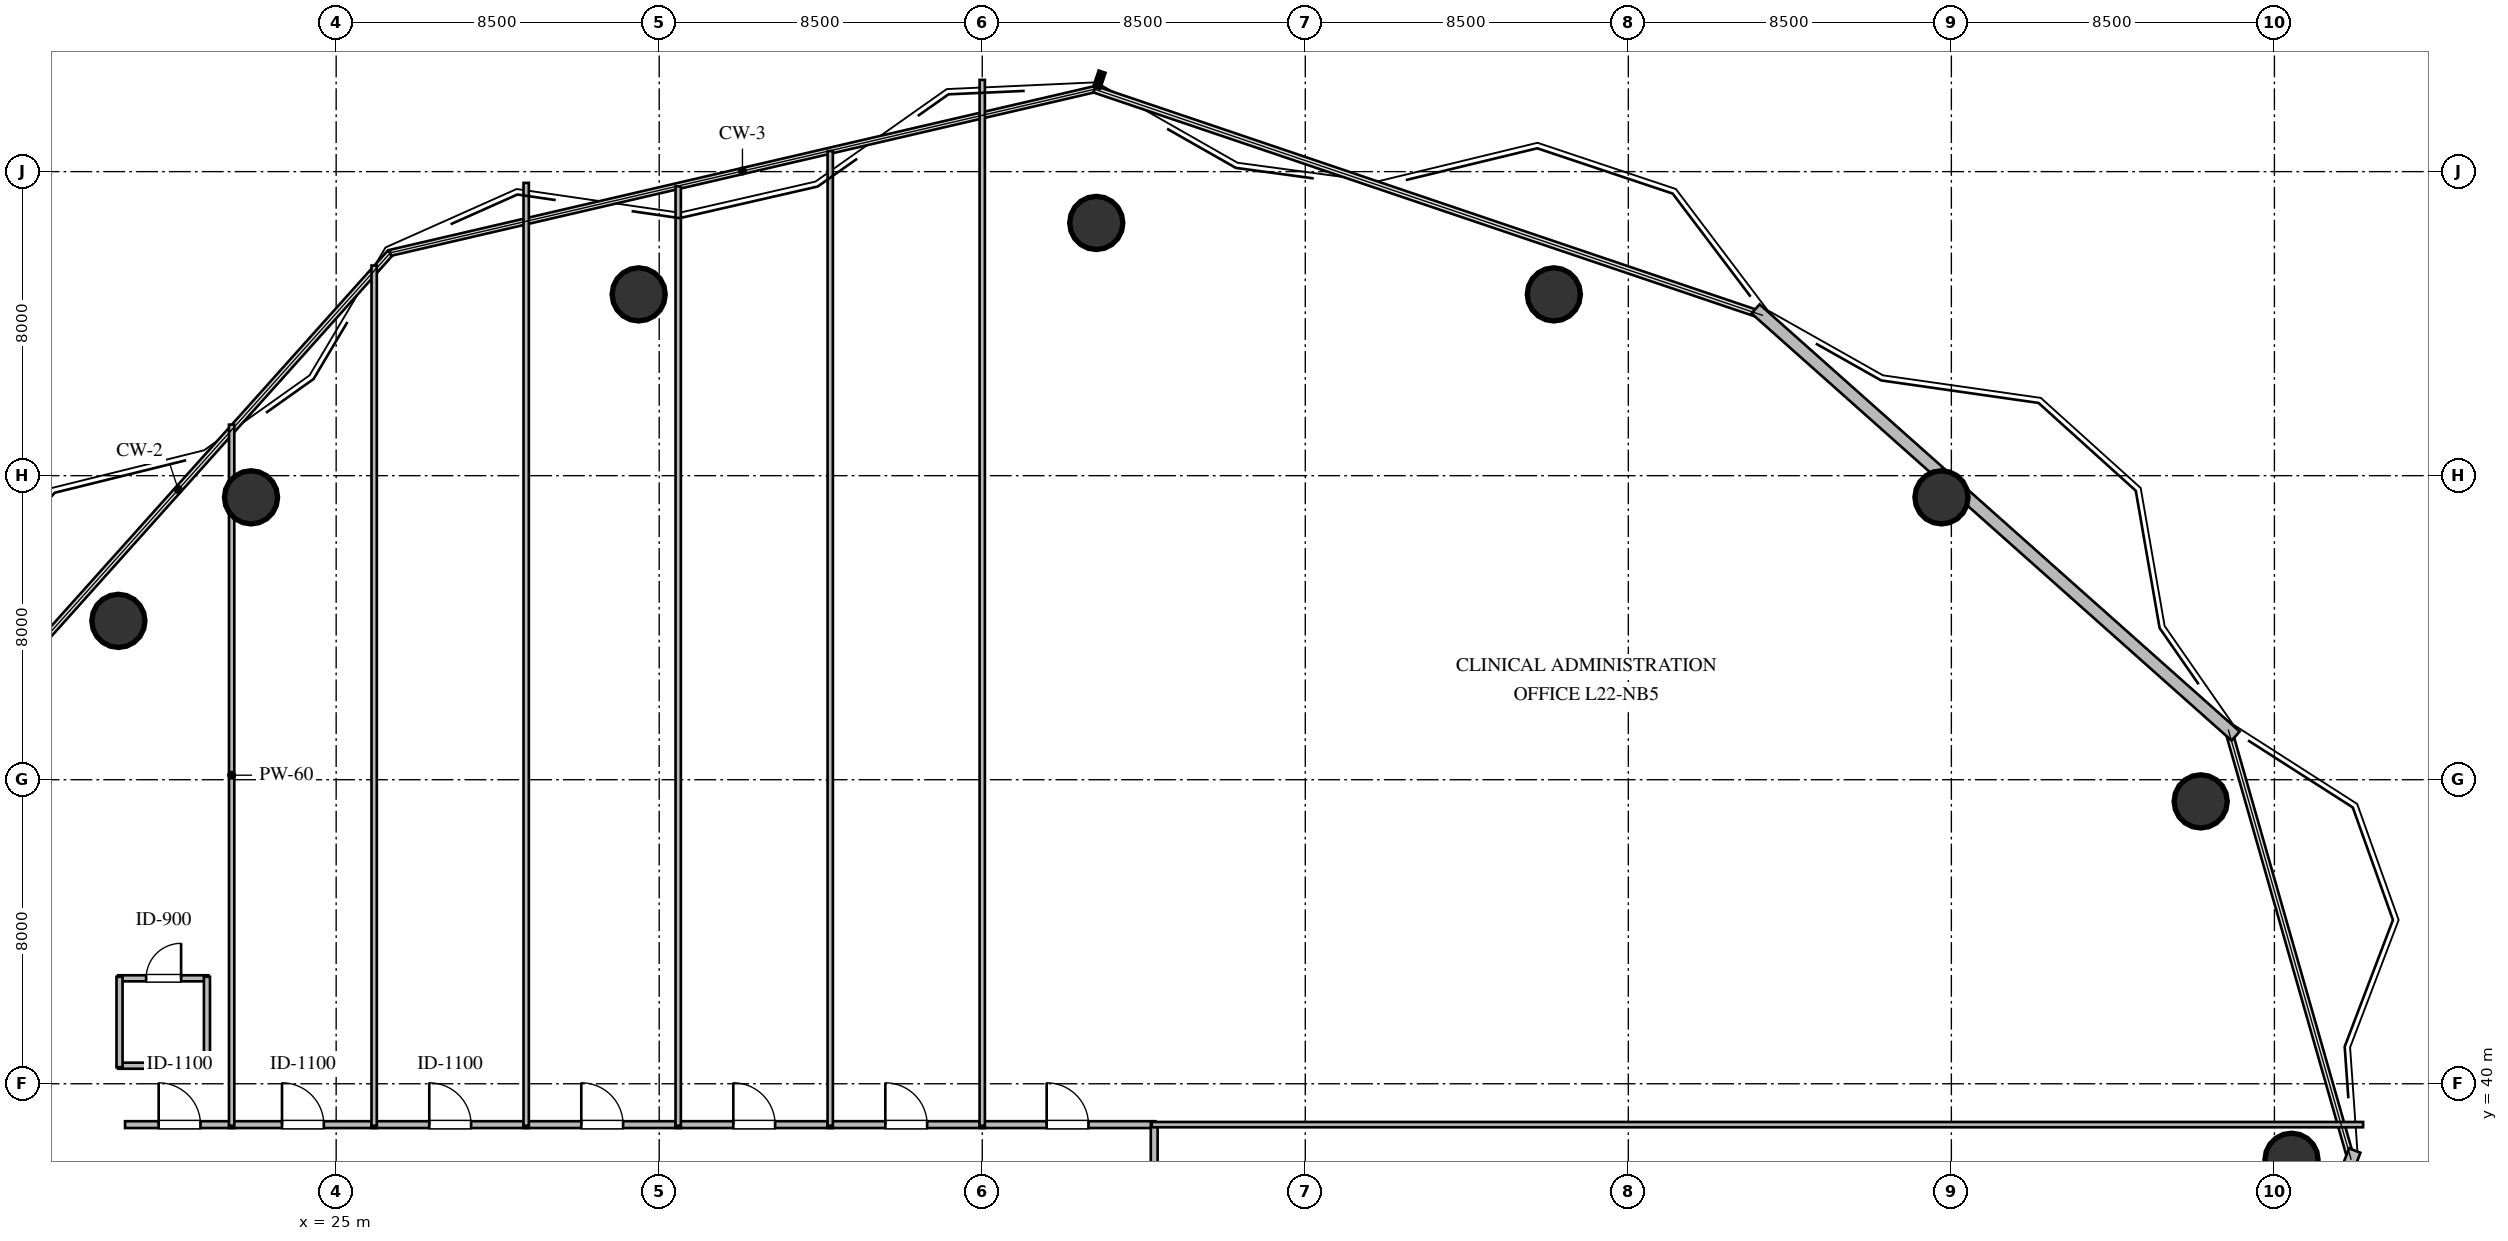
"""IFC4 building model, lengths in metres.
Left out: names, types, materials, properties, quantities, classifications, styles, units other than length and angle.
Written with IfcOpenShell. Run it as: python <this file> out.ifc"""

import sys

from ifc_helpers import new_model, si_unit, direction, frame, frame_2d, origin, origin_2d, place, context, subcontext, project, spatial, rectangle, circle, extrude, element, fill, save


model = new_model("IFC4")
c1 = context("Model", 3, precision=1e-05, world=origin(), true_north=direction((0.0, 1.0)))
c2 = subcontext(c1, "Body", "Model", "MODEL_VIEW")
j1 = project(units=[si_unit("LENGTHUNIT", "METRE"), si_unit("PLANEANGLEUNIT", "RADIAN")], contexts=[c1])
p1 = place(None, origin())
s1 = spatial("IfcSite", under=j1, at=p1, CompositionType="ELEMENT")
p2 = place(p1, origin())
s2 = spatial("IfcBuilding", under=s1, at=p2, CompositionType="ELEMENT")
p3 = place(p2, frame((0.0, 0.0, 85.2)))
s3 = spatial("IfcBuildingStorey", under=s2, at=p3, CompositionType="ELEMENT", Elevation=85.2)
for number, where, z_axis, x_axis in (
    (1, (76.45, 38.0, 0.0), (0.0, 0.0, 1.0), (1.0, 0.0, 0.0)),
    (2, (74.06, 47.43, 0.0), (0.0, 0.0, 1.0), (1.0, 0.0, 0.0)),
    (3, (67.24, 55.43, 0.0), (0.0, 0.0, 1.0), (1.0, 0.0, 0.0)),
    (4, (57.04, 60.77, 0.0), (0.0, 0.0, 1.0), (1.0, 0.0, 0.0)),
    (5, (45.0, 62.65, 0.0), (0.0, 0.0, 1.0), (1.0, 0.0, 0.0)),
    (6, (32.96, 60.77, 0.0), (0.0, 0.0, 1.0), (1.0, 0.0, 0.0)),
    (7, (22.76, 55.43, 0.0), (0.0, 0.0, 1.0), (1.0, 0.0, 0.0)),
    (8, (19.27, 52.18, 0.0), (0.0, 0.0, 1.0), (1.0, 0.0, 0.0)),
):
    element("IfcColumn", number, at=place(p3, frame(where, z_axis=z_axis, x_axis=x_axis)), inside=s3, PredefinedType="COLUMN", context=c2, shape_type="SweptSolid", body=[
        extrude(circle(Radius=0.7, at=origin_2d()), origin(), (0.0, 0.0, 1.0), 3.6),
    ])
p4 = place(p3, frame((78.114, 38.243, 0.0), z_axis=(0.0, 0.0, 1.0), x_axis=(-0.360517110943, -0.932752599952, 0.0)))
e9 = element("IfcWall", 9, at=p4, inside=s3, PredefinedType="STANDARD", context=c2, shape_type="SweptSolid", body=[
    extrude(rectangle(XDim=14.504, YDim=0.32, at=frame_2d((7.252, 0.0))), origin(), (0.0, 0.0, 1.0), 2.738),
])
p5 = place(p3, frame((62.348, 60.388, 0.0), z_axis=(0.0, 0.0, 1.0), x_axis=(0.747075414442, -0.664739291104, 0.0)))
e10 = element("IfcWall", 10, at=p5, inside=s3, PredefinedType="STANDARD", context=c2, shape_type="SweptSolid", body=[
    extrude(rectangle(XDim=16.907, YDim=0.32, at=frame_2d((8.454, 0.0))), origin(), (0.0, 0.0, 1.0), 3.36),
])
p6 = place(p3, frame((19.26, 40.475, 0.0), z_axis=(0.0, 0.0, 1.0), x_axis=(1.0, 0.0, 0.0)))
e11 = element("IfcWall", 11, at=p6, inside=s3, PredefinedType="PLUMBINGWALL", context=c2, shape_type="SweptSolid", body=[
    extrude(rectangle(XDim=2.38, YDim=0.16, at=frame_2d((1.19, 0.0))), origin(), (0.0, 0.0, 1.0), 3.36),
])
p7 = place(p3, frame((19.26, 42.775, 0.0), z_axis=(0.0, 0.0, 1.0), x_axis=(1.0, 0.0, 0.0)))
e12 = element("IfcWall", 12, at=p7, inside=s3, PredefinedType="PLUMBINGWALL", context=c2, shape_type="SweptSolid", body=[
    extrude(rectangle(XDim=2.38, YDim=0.16, at=frame_2d((1.19, 0.0))), origin(), (0.0, 0.0, 1.0), 3.36),
])
p8 = place(p7, frame((0.74, 0.0, 0.0)))
e13 = element("IfcOpeningElement", 13, at=p8, cuts=e12, PredefinedType="OPENING", context=c2, shape_type="SweptSolid", body=[
    extrude(rectangle(XDim=0.92, YDim=2.1, at=frame_2d((0.46, 1.05))), frame((0.0, 0.09, 0.0), z_axis=(0.0, -1.0, 0.0), x_axis=(1.0, 0.0, 0.0)), (0.0, 0.0, 1.0), 0.18),
])
p9 = place(p3, frame((19.3, 40.435, 0.0), z_axis=(0.0, 0.0, 1.0), x_axis=(0.0, 1.0, 0.0)))
e14 = element("IfcWall", 14, at=p9, inside=s3, PredefinedType="PLUMBINGWALL", context=c2, shape_type="SweptSolid", body=[
    extrude(rectangle(XDim=2.38, YDim=0.16, at=frame_2d((1.19, 0.0))), origin(), (0.0, 0.0, 1.0), 3.36),
])
p10 = place(p3, frame((21.6, 40.435, 0.0), z_axis=(0.0, 0.0, 1.0), x_axis=(0.0, 1.0, 0.0)))
e15 = element("IfcWall", 15, at=p10, inside=s3, PredefinedType="PLUMBINGWALL", context=c2, shape_type="SweptSolid", body=[
    extrude(rectangle(XDim=2.38, YDim=0.16, at=frame_2d((1.19, 0.0))), origin(), (0.0, 0.0, 1.0), 2.806),
])
p11 = place(p3, frame((19.445, 38.925, 0.0), z_axis=(0.0, 0.0, 1.0), x_axis=(1.0, 0.0, 0.0)))
e16 = element("IfcWall", 16, at=p11, inside=s3, PredefinedType="PARTITIONING", context=c2, shape_type="SweptSolid", body=[
    extrude(rectangle(XDim=2.87, YDim=0.18, at=frame_2d((1.435, 0.0))), origin(), (0.0, 0.0, 1.0), 3.36),
])
p12 = place(p11, frame((0.885, 0.0, 0.0)))
e17 = element("IfcOpeningElement", 17, at=p12, cuts=e16, PredefinedType="OPENING", context=c2, shape_type="SweptSolid", body=[
    extrude(rectangle(XDim=1.1, YDim=2.1, at=frame_2d((0.55, 1.05))), frame((0.0, 0.1, 0.0), z_axis=(0.0, -1.0, 0.0), x_axis=(1.0, 0.0, 0.0)), (0.0, 0.0, 1.0), 0.2),
])
p13 = place(p3, frame((22.185, 38.925, 0.0), z_axis=(0.0, 0.0, 1.0), x_axis=(1.0, 0.0, 0.0)))
e18 = element("IfcWall", 18, at=p13, inside=s3, PredefinedType="PARTITIONING", context=c2, shape_type="SweptSolid", body=[
    extrude(rectangle(XDim=3.88, YDim=0.18, at=frame_2d((1.94, 0.0))), origin(), (0.0, 0.0, 1.0), 3.36),
])
p14 = place(p13, frame((1.39, 0.0, 0.0)))
e19 = element("IfcOpeningElement", 19, at=p14, cuts=e18, PredefinedType="OPENING", context=c2, shape_type="SweptSolid", body=[
    extrude(rectangle(XDim=1.1, YDim=2.1, at=frame_2d((0.55, 1.05))), frame((0.0, 0.1, 0.0), z_axis=(0.0, -1.0, 0.0), x_axis=(1.0, 0.0, 0.0)), (0.0, 0.0, 1.0), 0.2),
])
p15 = place(p3, frame((25.935, 38.925, 0.0), z_axis=(0.0, 0.0, 1.0), x_axis=(1.0, 0.0, 0.0)))
e20 = element("IfcWall", 20, at=p15, inside=s3, PredefinedType="PARTITIONING", context=c2, shape_type="SweptSolid", body=[
    extrude(rectangle(XDim=4.13, YDim=0.18, at=frame_2d((2.065, 0.0))), origin(), (0.0, 0.0, 1.0), 3.36),
])
p16 = place(p15, frame((1.515, 0.0, 0.0)))
e21 = element("IfcOpeningElement", 21, at=p16, cuts=e20, PredefinedType="OPENING", context=c2, shape_type="SweptSolid", body=[
    extrude(rectangle(XDim=1.1, YDim=2.1, at=frame_2d((0.55, 1.05))), frame((0.0, 0.1, 0.0), z_axis=(0.0, -1.0, 0.0), x_axis=(1.0, 0.0, 0.0)), (0.0, 0.0, 1.0), 0.2),
])
p17 = place(p3, frame((29.935, 38.925, 0.0), z_axis=(0.0, 0.0, 1.0), x_axis=(1.0, 0.0, 0.0)))
e22 = element("IfcWall", 22, at=p17, inside=s3, PredefinedType="PARTITIONING", context=c2, shape_type="SweptSolid", body=[
    extrude(rectangle(XDim=4.13, YDim=0.18, at=frame_2d((2.065, 0.0))), origin(), (0.0, 0.0, 1.0), 3.36),
])
p18 = place(p17, frame((1.515, 0.0, 0.0)))
e23 = element("IfcOpeningElement", 23, at=p18, cuts=e22, PredefinedType="OPENING", context=c2, shape_type="SweptSolid", body=[
    extrude(rectangle(XDim=1.1, YDim=2.1, at=frame_2d((0.55, 1.05))), frame((0.0, 0.1, 0.0), z_axis=(0.0, -1.0, 0.0), x_axis=(1.0, 0.0, 0.0)), (0.0, 0.0, 1.0), 0.2),
])
p19 = place(p3, frame((33.935, 38.925, 0.0), z_axis=(0.0, 0.0, 1.0), x_axis=(1.0, 0.0, 0.0)))
e24 = element("IfcWall", 24, at=p19, inside=s3, PredefinedType="PARTITIONING", context=c2, shape_type="SweptSolid", body=[
    extrude(rectangle(XDim=4.13, YDim=0.18, at=frame_2d((2.065, 0.0))), origin(), (0.0, 0.0, 1.0), 3.36),
])
p20 = place(p19, frame((1.515, 0.0, 0.0)))
e25 = element("IfcOpeningElement", 25, at=p20, cuts=e24, PredefinedType="OPENING", context=c2, shape_type="SweptSolid", body=[
    extrude(rectangle(XDim=1.1, YDim=2.1, at=frame_2d((0.55, 1.05))), frame((0.0, 0.1, 0.0), z_axis=(0.0, -1.0, 0.0), x_axis=(1.0, 0.0, 0.0)), (0.0, 0.0, 1.0), 0.2),
])
p21 = place(p3, frame((37.935, 38.925, 0.0), z_axis=(0.0, 0.0, 1.0), x_axis=(1.0, 0.0, 0.0)))
e26 = element("IfcWall", 26, at=p21, inside=s3, PredefinedType="PARTITIONING", context=c2, shape_type="SweptSolid", body=[
    extrude(rectangle(XDim=4.13, YDim=0.18, at=frame_2d((2.065, 0.0))), origin(), (0.0, 0.0, 1.0), 3.36),
])
p22 = place(p21, frame((1.515, 0.0, 0.0)))
e27 = element("IfcOpeningElement", 27, at=p22, cuts=e26, PredefinedType="OPENING", context=c2, shape_type="SweptSolid", body=[
    extrude(rectangle(XDim=1.1, YDim=2.1, at=frame_2d((0.55, 1.05))), frame((0.0, 0.1, 0.0), z_axis=(0.0, -1.0, 0.0), x_axis=(1.0, 0.0, 0.0)), (0.0, 0.0, 1.0), 0.2),
])
p23 = place(p3, frame((41.935, 38.925, 0.0), z_axis=(0.0, 0.0, 1.0), x_axis=(1.0, 0.0, 0.0)))
e28 = element("IfcWall", 28, at=p23, inside=s3, PredefinedType="PARTITIONING", context=c2, shape_type="SweptSolid", body=[
    extrude(rectangle(XDim=4.62, YDim=0.18, at=frame_2d((2.31, 0.0))), origin(), (0.0, 0.0, 1.0), 3.36),
])
p24 = place(p23, frame((1.76, 0.0, 0.0)))
e29 = element("IfcOpeningElement", 29, at=p24, cuts=e28, PredefinedType="OPENING", context=c2, shape_type="SweptSolid", body=[
    extrude(rectangle(XDim=1.1, YDim=2.1, at=frame_2d((0.55, 1.05))), frame((0.0, 0.1, 0.0), z_axis=(0.0, -1.0, 0.0), x_axis=(1.0, 0.0, 0.0)), (0.0, 0.0, 1.0), 0.2),
])
p25 = place(p3, frame((46.525, 38.955, 0.0), z_axis=(0.0, 0.0, 1.0), x_axis=(0.0, -1.0, 0.0)))
e30 = element("IfcWall", 30, at=p25, inside=s3, PredefinedType="PARTITIONING", context=c2, shape_type="SweptSolid", body=[
    extrude(rectangle(XDim=4.31, YDim=0.18, at=frame_2d((2.155, 0.0))), origin(), (0.0, 0.0, 1.0), 3.36),
])
p26 = place(p25, frame((1.605, 0.0, 0.0)))
e31 = element("IfcOpeningElement", 31, at=p26, cuts=e30, PredefinedType="OPENING", context=c2, shape_type="SweptSolid", body=[
    extrude(rectangle(XDim=1.1, YDim=2.1, at=frame_2d((0.55, 1.05))), frame((0.0, 0.1, 0.0), z_axis=(0.0, -1.0, 0.0), x_axis=(1.0, 0.0, 0.0)), (0.0, 0.0, 1.0), 0.2),
])
p27 = place(p3, frame((22.25, 57.343, 0.0), z_axis=(0.0, 0.0, 1.0), x_axis=(0.0, -1.0, 0.0)))
e32 = element("IfcWall", 32, at=p27, inside=s3, PredefinedType="PARTITIONING", context=c2, shape_type="SweptSolid", body=[
    extrude(rectangle(XDim=18.448, YDim=0.14, at=frame_2d((9.224, 0.0))), origin(), (0.0, 0.0, 1.0), 2.806),
])
p28 = place(p3, frame((26.0, 61.529, 0.0), z_axis=(0.0, 0.0, 1.0), x_axis=(0.0, -1.0, 0.0)))
e33 = element("IfcWall", 33, at=p28, inside=s3, PredefinedType="PARTITIONING", context=c2, shape_type="SweptSolid", body=[
    extrude(rectangle(XDim=22.634, YDim=0.14, at=frame_2d((11.317, 0.0))), origin(), (0.0, 0.0, 1.0), 3.36),
])
p29 = place(p3, frame((30.0, 63.704, 0.0), z_axis=(0.0, 0.0, 1.0), x_axis=(0.0, -1.0, 0.0)))
e34 = element("IfcWall", 34, at=p29, inside=s3, PredefinedType="PARTITIONING", context=c2, shape_type="SweptSolid", body=[
    extrude(rectangle(XDim=24.809, YDim=0.14, at=frame_2d((12.405, 0.0))), origin(), (0.0, 0.0, 1.0), 2.806),
])
p30 = place(p3, frame((34.0, 63.613, 0.0), z_axis=(0.0, 0.0, 1.0), x_axis=(0.0, -1.0, 0.0)))
e35 = element("IfcWall", 35, at=p30, inside=s3, PredefinedType="PARTITIONING", context=c2, shape_type="SweptSolid", body=[
    extrude(rectangle(XDim=24.718, YDim=0.14, at=frame_2d((12.359, 0.0))), origin(), (0.0, 0.0, 1.0), 3.36),
])
p31 = place(p3, frame((38.0, 64.542, 0.0), z_axis=(0.0, 0.0, 1.0), x_axis=(0.0, -1.0, 0.0)))
e36 = element("IfcWall", 36, at=p31, inside=s3, PredefinedType="PARTITIONING", context=c2, shape_type="SweptSolid", body=[
    extrude(rectangle(XDim=25.647, YDim=0.14, at=frame_2d((12.823, 0.0))), origin(), (0.0, 0.0, 1.0), 3.36),
])
p32 = place(p3, frame((42.0, 66.414, 0.0), z_axis=(0.0, 0.0, 1.0), x_axis=(0.0, -1.0, 0.0)))
e37 = element("IfcWall", 37, at=p32, inside=s3, PredefinedType="PARTITIONING", context=c2, shape_type="SweptSolid", body=[
    extrude(rectangle(XDim=27.519, YDim=0.14, at=frame_2d((13.76, 0.0))), origin(), (0.0, 0.0, 1.0), 3.36),
])
p33 = place(p3, frame((78.334, 38.925, 0.0), z_axis=(0.0, 0.0, 1.0), x_axis=(-1.0, 0.0, 0.0)))
e38 = element("IfcWall", 38, at=p33, inside=s3, PredefinedType="PARTITIONING", context=c2, shape_type="SweptSolid", body=[
    extrude(rectangle(XDim=31.874, YDim=0.14, at=frame_2d((15.937, 0.0))), origin(), (0.0, 0.0, 1.0), 3.36),
])
p34 = place(p8, origin())
e39 = element("IfcDoor", 39, at=p34, inside=s3, OperationType="SINGLE_SWING_RIGHT", PredefinedType="DOOR", context=c2, shape_type="SweptSolid", body=[
    extrude(rectangle(XDim=0.92, YDim=2.1, at=frame_2d((0.46, 1.05))), frame((0.0, 0.025, 0.0), z_axis=(0.0, -1.0, 0.0), x_axis=(1.0, 0.0, 0.0)), (0.0, 0.0, 1.0), 0.05),
])
fill(e13, e39)
p35 = place(p12, origin())
e40 = element("IfcDoor", 40, at=p35, inside=s3, OperationType="SINGLE_SWING_LEFT", PredefinedType="DOOR", context=c2, shape_type="SweptSolid", body=[
    extrude(rectangle(XDim=1.1, YDim=2.1, at=frame_2d((0.55, 1.05))), frame((0.0, 0.025, 0.0), z_axis=(0.0, -1.0, 0.0), x_axis=(1.0, 0.0, 0.0)), (0.0, 0.0, 1.0), 0.05),
])
fill(e17, e40)
p36 = place(p14, origin())
e41 = element("IfcDoor", 41, at=p36, inside=s3, OperationType="SINGLE_SWING_LEFT", PredefinedType="DOOR", context=c2, shape_type="SweptSolid", body=[
    extrude(rectangle(XDim=1.1, YDim=2.1, at=frame_2d((0.55, 1.05))), frame((0.0, 0.025, 0.0), z_axis=(0.0, -1.0, 0.0), x_axis=(1.0, 0.0, 0.0)), (0.0, 0.0, 1.0), 0.05),
])
fill(e19, e41)
p37 = place(p16, origin())
e42 = element("IfcDoor", 42, at=p37, inside=s3, OperationType="SINGLE_SWING_LEFT", PredefinedType="DOOR", context=c2, shape_type="SweptSolid", body=[
    extrude(rectangle(XDim=1.1, YDim=2.1, at=frame_2d((0.55, 1.05))), frame((0.0, 0.025, 0.0), z_axis=(0.0, -1.0, 0.0), x_axis=(1.0, 0.0, 0.0)), (0.0, 0.0, 1.0), 0.05),
])
fill(e21, e42)
p38 = place(p18, origin())
e43 = element("IfcDoor", 43, at=p38, inside=s3, OperationType="SINGLE_SWING_LEFT", PredefinedType="DOOR", context=c2, shape_type="SweptSolid", body=[
    extrude(rectangle(XDim=1.1, YDim=2.1, at=frame_2d((0.55, 1.05))), frame((0.0, 0.025, 0.0), z_axis=(0.0, -1.0, 0.0), x_axis=(1.0, 0.0, 0.0)), (0.0, 0.0, 1.0), 0.05),
])
fill(e23, e43)
p39 = place(p20, origin())
e44 = element("IfcDoor", 44, at=p39, inside=s3, OperationType="SINGLE_SWING_LEFT", PredefinedType="DOOR", context=c2, shape_type="SweptSolid", body=[
    extrude(rectangle(XDim=1.1, YDim=2.1, at=frame_2d((0.55, 1.05))), frame((0.0, 0.025, 0.0), z_axis=(0.0, -1.0, 0.0), x_axis=(1.0, 0.0, 0.0)), (0.0, 0.0, 1.0), 0.05),
])
fill(e25, e44)
p40 = place(p22, origin())
e45 = element("IfcDoor", 45, at=p40, inside=s3, OperationType="SINGLE_SWING_LEFT", PredefinedType="DOOR", context=c2, shape_type="SweptSolid", body=[
    extrude(rectangle(XDim=1.1, YDim=2.1, at=frame_2d((0.55, 1.05))), frame((0.0, 0.025, 0.0), z_axis=(0.0, -1.0, 0.0), x_axis=(1.0, 0.0, 0.0)), (0.0, 0.0, 1.0), 0.05),
])
fill(e27, e45)
p41 = place(p24, origin())
e46 = element("IfcDoor", 46, at=p41, inside=s3, OperationType="SINGLE_SWING_LEFT", PredefinedType="DOOR", context=c2, shape_type="SweptSolid", body=[
    extrude(rectangle(XDim=1.1, YDim=2.1, at=frame_2d((0.55, 1.05))), frame((0.0, 0.025, 0.0), z_axis=(0.0, -1.0, 0.0), x_axis=(1.0, 0.0, 0.0)), (0.0, 0.0, 1.0), 0.05),
])
fill(e29, e46)
save(model, sys.argv[1])
